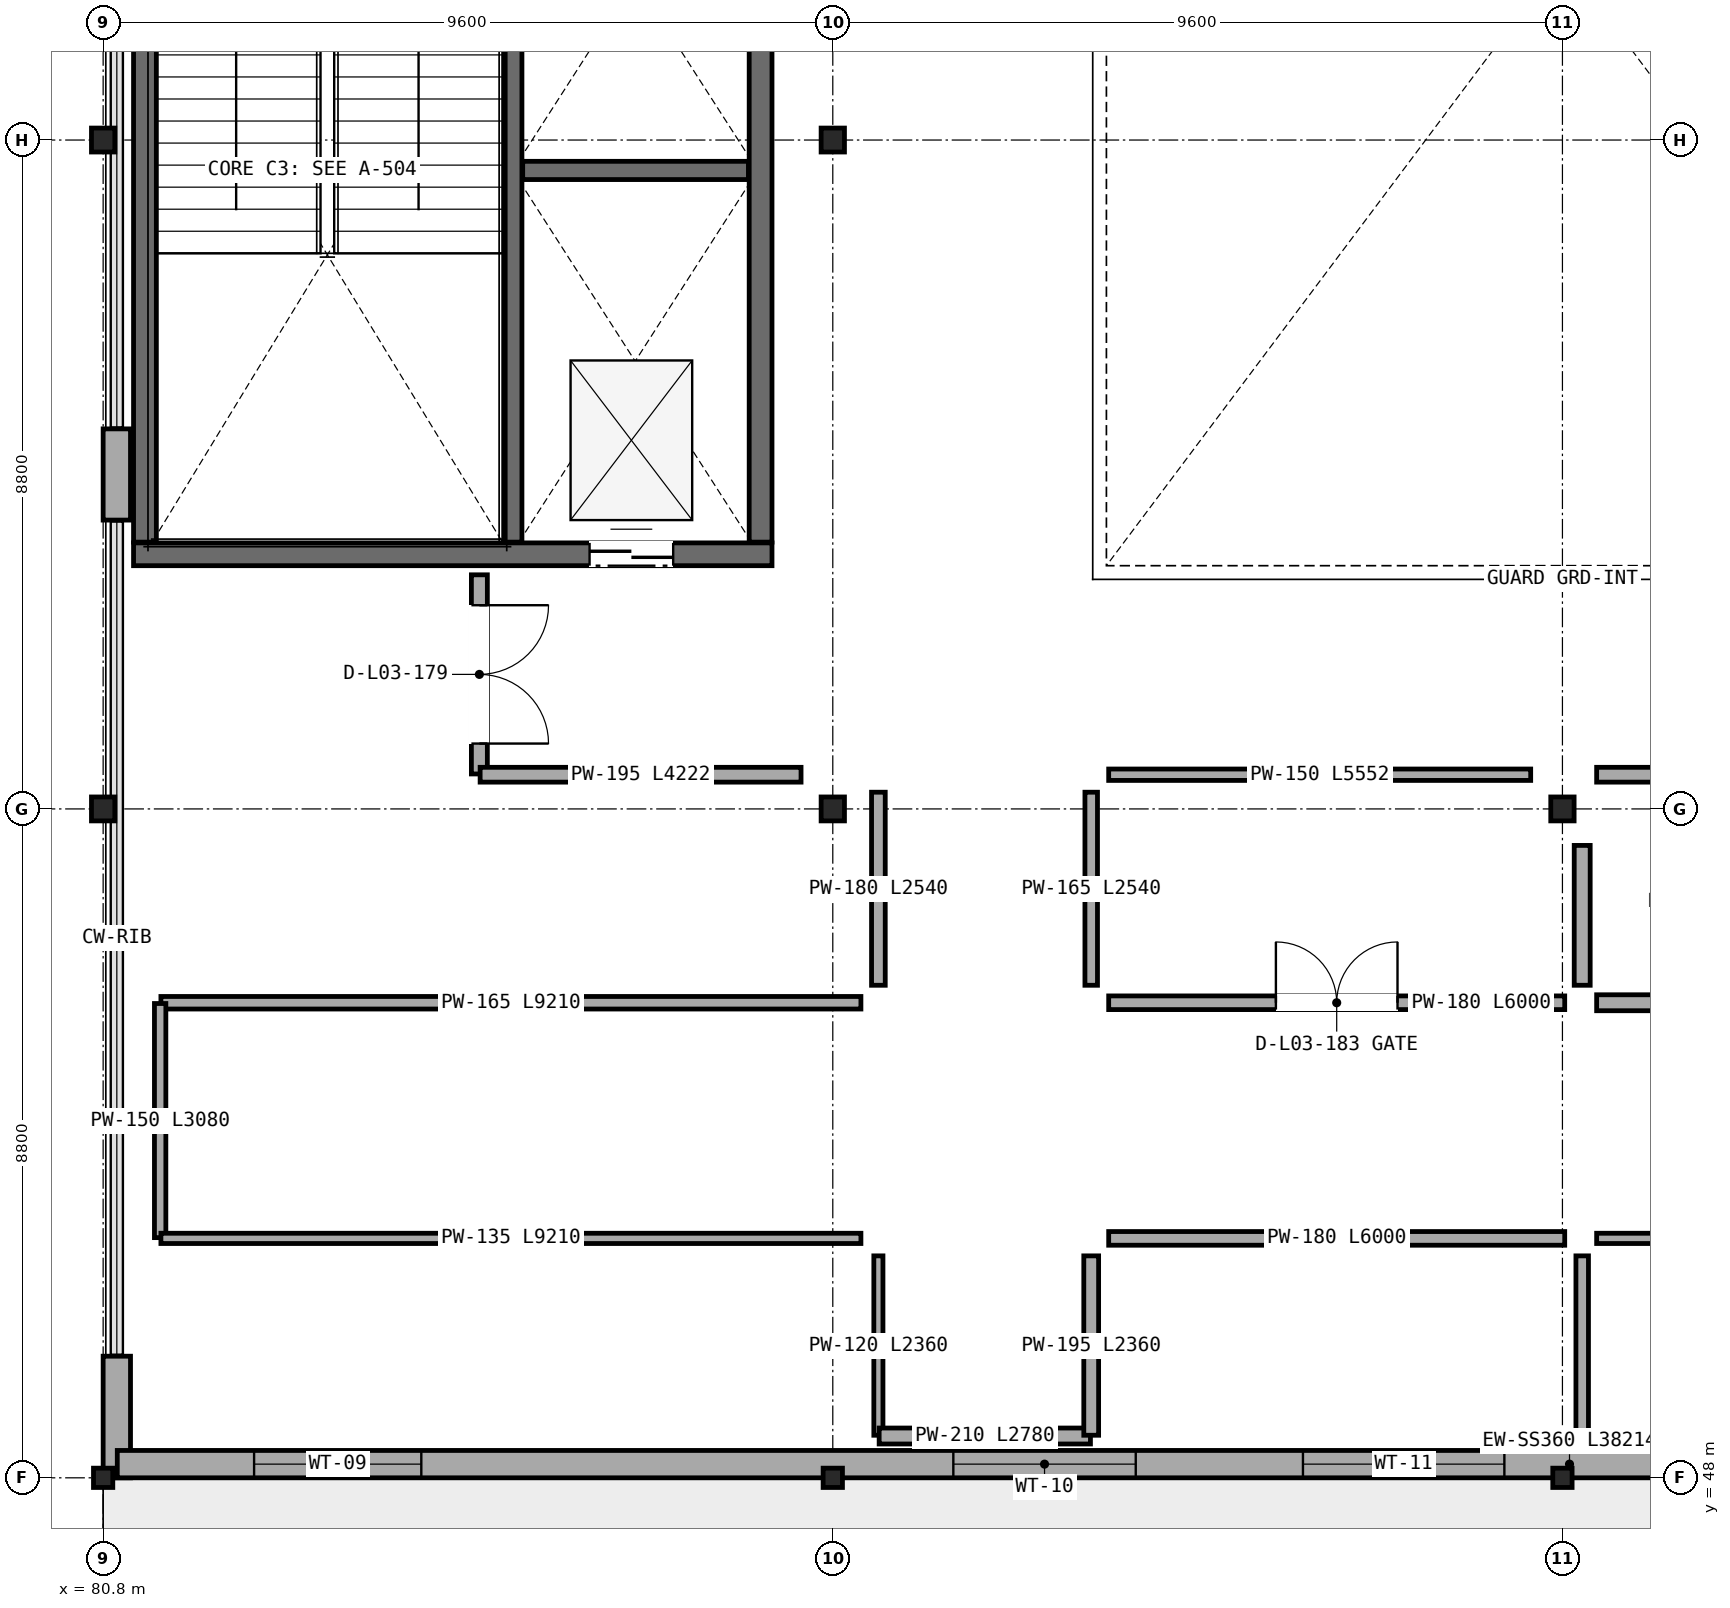
"""IFC4 building model, lengths in metres.
Left out: names, types, materials, properties, quantities, classifications, styles, units other than length and angle.
Written with IfcOpenShell. Run it as: python <this file> out.ifc"""

import sys

from ifc_helpers import new_model, si_unit, direction, frame, frame_2d, origin, origin_2d, place, context, subcontext, project, spatial, rectangle, i_section, extrude, element, fill, save


model = new_model("IFC4")
c1 = context("Model", 3, precision=1e-05, world=origin(), true_north=direction((0.0, 1.0)))
c2 = subcontext(c1, "Body", "Model", "MODEL_VIEW")
j1 = project(units=[si_unit("LENGTHUNIT", "METRE"), si_unit("PLANEANGLEUNIT", "RADIAN")], contexts=[c1])
p1 = place(None, origin())
s1 = spatial("IfcSite", under=j1, at=p1, CompositionType="ELEMENT")
p2 = place(p1, origin())
s2 = spatial("IfcBuilding", under=s1, at=p2, CompositionType="ELEMENT")
p3 = place(p2, frame((0.0, 0.0, 14.6)))
s3 = spatial("IfcBuildingStorey", under=s2, at=p3, CompositionType="ELEMENT", Elevation=14.6)
p4 = place(p3, frame((90.4, 48.0, 0.0), z_axis=(0.0, 0.0, 1.0), x_axis=(1.0, 0.0, 0.0)))
e1 = element("IfcColumn", 1, at=p4, inside=s3, PredefinedType="COLUMN", context=c2, shape_type="SweptSolid", body=[
    extrude(i_section(OverallWidth=0.254, OverallDepth=0.254, WebThickness=0.009, FlangeThickness=0.014, FilletRadius=0.013, at=origin_2d()), origin(), (0.0, 0.0, 1.0), 4.5),
])
for number, where, z_axis, x_axis in (
    (2, (90.4, 56.8, 0.0), (0.0, 0.0, 1.0), (1.0, 0.0, 0.0)),
    (3, (90.4, 65.6, 0.0), (0.0, 0.0, 1.0), (1.0, 0.0, 0.0)),
):
    element("IfcColumn", number, at=place(p3, frame(where, z_axis=z_axis, x_axis=x_axis)), inside=s3, PredefinedType="COLUMN", context=c2, shape_type="SweptSolid", body=[
        extrude(i_section(OverallWidth=0.307, OverallDepth=0.315, WebThickness=0.012, FlangeThickness=0.019, FilletRadius=0.017, at=origin_2d()), origin(), (0.0, 0.0, 1.0), 4.5),
    ])
p5 = place(p3, frame((100.0, 48.0, 0.0), z_axis=(0.0, 0.0, 1.0), x_axis=(1.0, 0.0, 0.0)))
e4 = element("IfcColumn", 4, at=p5, inside=s3, PredefinedType="COLUMN", context=c2, shape_type="SweptSolid", body=[
    extrude(i_section(OverallWidth=0.254, OverallDepth=0.254, WebThickness=0.009, FlangeThickness=0.014, FilletRadius=0.013, at=origin_2d()), origin(), (0.0, 0.0, 1.0), 4.5),
])
p6 = place(p3, frame((100.0, 56.8, 0.0), z_axis=(0.0, 0.0, 1.0), x_axis=(1.0, 0.0, 0.0)))
e5 = element("IfcColumn", 5, at=p6, inside=s3, PredefinedType="COLUMN", context=c2, shape_type="SweptSolid", body=[
    extrude(i_section(OverallWidth=0.307, OverallDepth=0.315, WebThickness=0.012, FlangeThickness=0.019, FilletRadius=0.017, at=origin_2d()), origin(), (0.0, 0.0, 1.0), 4.5),
])
p7 = place(p3, frame((80.8, 48.0, 0.0), z_axis=(0.0, 0.0, 1.0), x_axis=(1.0, 0.0, 0.0)))
e6 = element("IfcColumn", 6, at=p7, inside=s3, PredefinedType="COLUMN", context=c2, shape_type="SweptSolid", body=[
    extrude(i_section(OverallWidth=0.254, OverallDepth=0.254, WebThickness=0.009, FlangeThickness=0.014, FilletRadius=0.013, at=origin_2d()), origin(), (0.0, 0.0, 1.0), 4.5),
])
for number, where, z_axis, x_axis in (
    (7, (80.8, 56.8, 0.0), (0.0, 0.0, 1.0), (1.0, 0.0, 0.0)),
    (8, (80.8, 65.6, 0.0), (0.0, 0.0, 1.0), (1.0, 0.0, 0.0)),
):
    element("IfcColumn", number, at=place(p3, frame(where, z_axis=z_axis, x_axis=x_axis)), inside=s3, PredefinedType="COLUMN", context=c2, shape_type="SweptSolid", body=[
        extrude(i_section(OverallWidth=0.307, OverallDepth=0.315, WebThickness=0.012, FlangeThickness=0.019, FilletRadius=0.017, at=origin_2d()), origin(), (0.0, 0.0, 1.0), 4.5),
    ])
p8 = place(p3, frame((80.98, 61.8, 0.0), z_axis=(0.0, 0.0, 1.0), x_axis=(0.0, -1.0, 0.0)))
e9 = element("IfcWall", 9, at=p8, inside=s3, PredefinedType="SOLIDWALL", context=c2, shape_type="SweptSolid", body=[
    extrude(rectangle(XDim=1.2, YDim=0.36, at=frame_2d((0.6, 0.0))), origin(), (0.0, 0.0, 1.0), 3.778),
])
p9 = place(p3, frame((80.98, 49.6, 0.0), z_axis=(0.0, 0.0, 1.0), x_axis=(0.0, -1.0, 0.0)))
e10 = element("IfcWall", 10, at=p9, inside=s3, PredefinedType="SOLIDWALL", context=c2, shape_type="SweptSolid", body=[
    extrude(rectangle(XDim=1.6, YDim=0.36, at=frame_2d((0.8, 0.0))), origin(), (0.0, 0.0, 1.0), 3.682),
])
p10 = place(p3, frame((80.986, 48.18, 0.0), z_axis=(0.0, 0.0, 1.0), x_axis=(1.0, 0.0, 0.0)))
e11 = element("IfcWall", 11, at=p10, inside=s3, PredefinedType="SOLIDWALL", context=c2, shape_type="SweptSolid", body=[
    extrude(rectangle(XDim=38.214, YDim=0.36, at=frame_2d((19.107, 0.0))), origin(), (0.0, 0.0, 1.0), 3.682),
])
p11 = place(p10, frame((1.8, 0.0, 0.9)))
e12 = element("IfcOpeningElement", 12, at=p11, cuts=e11, PredefinedType="OPENING", context=c2, shape_type="SweptSolid", body=[
    extrude(rectangle(XDim=2.2, YDim=1.55, at=frame_2d((1.1, 0.775))), frame((0.0, 0.19, 0.0), z_axis=(0.0, -1.0, 0.0), x_axis=(1.0, 0.0, 0.0)), (0.0, 0.0, 1.0), 0.38),
])
p12 = place(p10, frame((11.0, 0.0, 0.9)))
e13 = element("IfcOpeningElement", 13, at=p12, cuts=e11, PredefinedType="OPENING", context=c2, shape_type="SweptSolid", body=[
    extrude(rectangle(XDim=2.4, YDim=1.55, at=frame_2d((1.2, 0.775))), frame((0.0, 0.19, 0.0), z_axis=(0.0, -1.0, 0.0), x_axis=(1.0, 0.0, 0.0)), (0.0, 0.0, 1.0), 0.38),
])
p13 = place(p10, frame((15.6, 0.0, 0.9)))
e14 = element("IfcOpeningElement", 14, at=p13, cuts=e11, PredefinedType="OPENING", context=c2, shape_type="SweptSolid", body=[
    extrude(rectangle(XDim=2.65, YDim=1.55, at=frame_2d((1.325, 0.775))), frame((0.0, 0.19, 0.0), z_axis=(0.0, -1.0, 0.0), x_axis=(1.0, 0.0, 0.0)), (0.0, 0.0, 1.0), 0.38),
])
p14 = place(p10, frame((20.2, 0.0, 0.9)))
e15 = element("IfcOpeningElement", 15, at=p14, cuts=e11, PredefinedType="OPENING", context=c2, shape_type="SweptSolid", body=[
    extrude(rectangle(XDim=0.95, YDim=1.85, at=frame_2d((0.475, 0.925))), frame((0.0, 0.19, 0.0), z_axis=(0.0, -1.0, 0.0), x_axis=(1.0, 0.0, 0.0)), (0.0, 0.0, 1.0), 0.38),
])
p15 = place(p10, frame((24.8, 0.0, 0.9)))
e16 = element("IfcOpeningElement", 16, at=p15, cuts=e11, PredefinedType="OPENING", context=c2, shape_type="SweptSolid", body=[
    extrude(rectangle(XDim=1.1, YDim=1.85, at=frame_2d((0.55, 0.925))), frame((0.0, 0.19, 0.0), z_axis=(0.0, -1.0, 0.0), x_axis=(1.0, 0.0, 0.0)), (0.0, 0.0, 1.0), 0.38),
])
p16 = place(p10, frame((29.4, 0.0, 0.9)))
e17 = element("IfcOpeningElement", 17, at=p16, cuts=e11, PredefinedType="OPENING", context=c2, shape_type="SweptSolid", body=[
    extrude(rectangle(XDim=1.25, YDim=1.85, at=frame_2d((0.625, 0.925))), frame((0.0, 0.19, 0.0), z_axis=(0.0, -1.0, 0.0), x_axis=(1.0, 0.0, 0.0)), (0.0, 0.0, 1.0), 0.38),
])
p17 = place(p3, frame((81.2, 60.15, 0.0), z_axis=(0.0, 0.0, 1.0), x_axis=(1.0, 0.0, 0.0)))
e18 = element("IfcWall", 18, at=p17, inside=s3, PredefinedType="SHEAR", context=c2, shape_type="SweptSolid", body=[
    extrude(rectangle(XDim=8.4, YDim=0.3, at=frame_2d((4.2, 0.0))), origin(), (0.0, 0.0, 1.0), 4.245),
])
p18 = place(p17, frame((6.0, 0.0, 0.0)))
e19 = element("IfcOpeningElement", 19, at=p18, cuts=e18, PredefinedType="OPENING", context=c2, shape_type="SweptSolid", body=[
    extrude(rectangle(XDim=1.1, YDim=2.2, at=frame_2d((0.55, 1.1))), frame((0.0, 0.16, 0.0), z_axis=(0.0, -1.0, 0.0), x_axis=(1.0, 0.0, 0.0)), (0.0, 0.0, 1.0), 0.32),
])
for number, where, z_axis, x_axis in (
    (20, (89.45, 60.31, 0.0), (0.0, 0.0, 1.0), (0.0, 1.0, 0.0)),
    (21, (81.35, 70.09, 0.0), (0.0, 0.0, 1.0), (0.0, -1.0, 0.0)),
):
    element("IfcWall", number, at=place(p3, frame(where, z_axis=z_axis, x_axis=x_axis)), inside=s3, PredefinedType="SHEAR", context=c2, shape_type="SweptSolid", body=[
        extrude(rectangle(XDim=9.78, YDim=0.3, at=frame_2d((4.89, 0.0))), origin(), (0.0, 0.0, 1.0), 4.245),
    ])
p19 = place(p3, frame((86.19, 60.31, 0.0), z_axis=(0.0, 0.0, 1.0), x_axis=(0.0, 1.0, 0.0)))
e22 = element("IfcWall", 22, at=p19, inside=s3, PredefinedType="SOLIDWALL", context=c2, shape_type="SweptSolid", body=[
    extrude(rectangle(XDim=9.78, YDim=0.24, at=frame_2d((4.89, 0.0))), origin(), (0.0, 0.0, 1.0), 4.245),
])
p20 = place(p3, frame((86.32, 65.2, 0.0), z_axis=(0.0, 0.0, 1.0), x_axis=(1.0, 0.0, 0.0)))
e23 = element("IfcWall", 23, at=p20, inside=s3, PredefinedType="SOLIDWALL", context=c2, shape_type="SweptSolid", body=[
    extrude(rectangle(XDim=2.97, YDim=0.24, at=frame_2d((1.485, 0.0))), origin(), (0.0, 0.0, 1.0), 4.245),
])
p21 = place(p3, frame((85.75, 59.88, 0.0), z_axis=(0.0, 0.0, 1.0), x_axis=(0.0, -1.0, 0.0)))
e24 = element("IfcWall", 24, at=p21, inside=s3, PredefinedType="PARTITIONING", context=c2, shape_type="SweptSolid", body=[
    extrude(rectangle(XDim=2.62, YDim=0.21, at=frame_2d((1.31, 0.0))), origin(), (0.0, 0.0, 1.0), 4.13),
])
p22 = place(p21, frame((0.4, 0.0, 0.0)))
e25 = element("IfcOpeningElement", 25, at=p22, cuts=e24, PredefinedType="OPENING", context=c2, shape_type="SweptSolid", body=[
    extrude(rectangle(XDim=1.82, YDim=2.34, at=frame_2d((0.91, 1.17))), frame((0.0, 0.115, 0.0), z_axis=(0.0, -1.0, 0.0), x_axis=(1.0, 0.0, 0.0)), (0.0, 0.0, 1.0), 0.23),
])
p23 = place(p3, frame((85.76, 57.25, 0.0), z_axis=(0.0, 0.0, 1.0), x_axis=(1.0, 0.0, 0.0)))
e26 = element("IfcWall", 26, at=p23, inside=s3, PredefinedType="PARTITIONING", context=c2, shape_type="SweptSolid", body=[
    extrude(rectangle(XDim=4.222, YDim=0.195, at=frame_2d((2.111, 0.0))), origin(), (0.0, 0.0, 1.0), 4.13),
])
p24 = place(p3, frame((91.0, 57.02, 0.0), z_axis=(0.0, 0.0, 1.0), x_axis=(0.0, -1.0, 0.0)))
e27 = element("IfcWall", 27, at=p24, inside=s3, PredefinedType="PARTITIONING", context=c2, shape_type="SweptSolid", body=[
    extrude(rectangle(XDim=2.54, YDim=0.18, at=frame_2d((1.27, 0.0))), origin(), (0.0, 0.0, 1.0), 3.667),
])
p25 = place(p3, frame((90.77, 54.25, 0.0), z_axis=(0.0, 0.0, 1.0), x_axis=(-1.0, 0.0, 0.0)))
e28 = element("IfcWall", 28, at=p25, inside=s3, PredefinedType="PARTITIONING", context=c2, shape_type="SweptSolid", body=[
    extrude(rectangle(XDim=9.21, YDim=0.165, at=frame_2d((4.605, 0.0))), origin(), (0.0, 0.0, 1.0), 3.743),
])
p26 = place(p3, frame((81.55, 54.24, 0.0), z_axis=(0.0, 0.0, 1.0), x_axis=(0.0, -1.0, 0.0)))
e29 = element("IfcWall", 29, at=p26, inside=s3, PredefinedType="PARTITIONING", context=c2, shape_type="SweptSolid", body=[
    extrude(rectangle(XDim=3.08, YDim=0.15, at=frame_2d((1.54, 0.0))), origin(), (0.0, 0.0, 1.0), 4.13),
])
p27 = place(p3, frame((81.56, 51.15, 0.0), z_axis=(0.0, 0.0, 1.0), x_axis=(1.0, 0.0, 0.0)))
e30 = element("IfcWall", 30, at=p27, inside=s3, PredefinedType="PARTITIONING", context=c2, shape_type="SweptSolid", body=[
    extrude(rectangle(XDim=9.21, YDim=0.135, at=frame_2d((4.605, 0.0))), origin(), (0.0, 0.0, 1.0), 3.743),
])
p28 = place(p3, frame((91.0, 50.92, 0.0), z_axis=(0.0, 0.0, 1.0), x_axis=(0.0, -1.0, 0.0)))
e31 = element("IfcWall", 31, at=p28, inside=s3, PredefinedType="PARTITIONING", context=c2, shape_type="SweptSolid", body=[
    extrude(rectangle(XDim=2.36, YDim=0.12, at=frame_2d((1.18, 0.0))), origin(), (0.0, 0.0, 1.0), 4.13),
])
p29 = place(p3, frame((91.01, 48.55, 0.0), z_axis=(0.0, 0.0, 1.0), x_axis=(1.0, 0.0, 0.0)))
e32 = element("IfcWall", 32, at=p29, inside=s3, PredefinedType="PARTITIONING", context=c2, shape_type="SweptSolid", body=[
    extrude(rectangle(XDim=2.78, YDim=0.21, at=frame_2d((1.39, 0.0))), origin(), (0.0, 0.0, 1.0), 3.944),
])
p30 = place(p3, frame((93.8, 48.56, 0.0), z_axis=(0.0, 0.0, 1.0), x_axis=(0.0, 1.0, 0.0)))
e33 = element("IfcWall", 33, at=p30, inside=s3, PredefinedType="PARTITIONING", context=c2, shape_type="SweptSolid", body=[
    extrude(rectangle(XDim=2.36, YDim=0.195, at=frame_2d((1.18, 0.0))), origin(), (0.0, 0.0, 1.0), 4.13),
])
p31 = place(p3, frame((94.03, 51.15, 0.0), z_axis=(0.0, 0.0, 1.0), x_axis=(1.0, 0.0, 0.0)))
e34 = element("IfcWall", 34, at=p31, inside=s3, PredefinedType="PARTITIONING", context=c2, shape_type="SweptSolid", body=[
    extrude(rectangle(XDim=6.0, YDim=0.18, at=frame_2d((3.0, 0.0))), origin(), (0.0, 0.0, 1.0), 3.743),
])
p32 = place(p3, frame((100.03, 54.25, 0.0), z_axis=(0.0, 0.0, 1.0), x_axis=(-1.0, 0.0, 0.0)))
e35 = element("IfcWall", 35, at=p32, inside=s3, PredefinedType="PARTITIONING", context=c2, shape_type="SweptSolid", body=[
    extrude(rectangle(XDim=6.0, YDim=0.18, at=frame_2d((3.0, 0.0))), origin(), (0.0, 0.0, 1.0), 3.743),
])
p33 = place(p32, frame((2.2, 0.0, 0.0)))
e36 = element("IfcOpeningElement", 36, at=p33, cuts=e35, PredefinedType="OPENING", context=c2, shape_type="SweptSolid", body=[
    extrude(rectangle(XDim=1.6, YDim=2.1, at=frame_2d((0.8, 1.05))), frame((0.0, 0.1, 0.0), z_axis=(0.0, -1.0, 0.0), x_axis=(1.0, 0.0, 0.0)), (0.0, 0.0, 1.0), 0.2),
])
p34 = place(p3, frame((93.8, 54.48, 0.0), z_axis=(0.0, 0.0, 1.0), x_axis=(0.0, 1.0, 0.0)))
e37 = element("IfcWall", 37, at=p34, inside=s3, PredefinedType="PARTITIONING", context=c2, shape_type="SweptSolid", body=[
    extrude(rectangle(XDim=2.54, YDim=0.165, at=frame_2d((1.27, 0.0))), origin(), (0.0, 0.0, 1.0), 3.667),
])
p35 = place(p3, frame((94.03, 57.25, 0.0), z_axis=(0.0, 0.0, 1.0), x_axis=(1.0, 0.0, 0.0)))
e38 = element("IfcWall", 38, at=p35, inside=s3, PredefinedType="PARTITIONING", context=c2, shape_type="SweptSolid", body=[
    extrude(rectangle(XDim=5.552, YDim=0.15, at=frame_2d((2.776, 0.0))), origin(), (0.0, 0.0, 1.0), 4.13),
])
p36 = place(p3, frame((100.45, 51.15, 0.0), z_axis=(0.0, 0.0, 1.0), x_axis=(1.0, 0.0, 0.0)))
e39 = element("IfcWall", 39, at=p36, inside=s3, PredefinedType="PARTITIONING", context=c2, shape_type="SweptSolid", body=[
    extrude(rectangle(XDim=5.52, YDim=0.135, at=frame_2d((2.76, 0.0))), origin(), (0.0, 0.0, 1.0), 3.993),
])
p37 = place(p3, frame((105.97, 54.25, 0.0), z_axis=(0.0, 0.0, 1.0), x_axis=(-1.0, 0.0, 0.0)))
e40 = element("IfcWall", 40, at=p37, inside=s3, PredefinedType="PARTITIONING", context=c2, shape_type="SweptSolid", body=[
    extrude(rectangle(XDim=5.52, YDim=0.21, at=frame_2d((2.76, 0.0))), origin(), (0.0, 0.0, 1.0), 3.993),
])
p38 = place(p3, frame((100.45, 57.25, 0.0), z_axis=(0.0, 0.0, 1.0), x_axis=(1.0, 0.0, 0.0)))
e41 = element("IfcWall", 41, at=p38, inside=s3, PredefinedType="PARTITIONING", context=c2, shape_type="SweptSolid", body=[
    extrude(rectangle(XDim=5.52, YDim=0.195, at=frame_2d((2.76, 0.0))), origin(), (0.0, 0.0, 1.0), 4.13),
])
p39 = place(p3, frame((100.26, 50.92, 0.0), z_axis=(0.0, 0.0, 1.0), x_axis=(0.0, -1.0, 0.0)))
e42 = element("IfcWall", 42, at=p39, inside=s3, PredefinedType="PARTITIONING", context=c2, shape_type="SweptSolid", body=[
    extrude(rectangle(XDim=2.44, YDim=0.165, at=frame_2d((1.22, 0.0))), origin(), (0.0, 0.0, 1.0), 3.743),
])
p40 = place(p3, frame((100.26, 56.32, 0.0), z_axis=(0.0, 0.0, 1.0), x_axis=(0.0, -1.0, 0.0)))
e43 = element("IfcWall", 43, at=p40, inside=s3, PredefinedType="PARTITIONING", context=c2, shape_type="SweptSolid", body=[
    extrude(rectangle(XDim=1.84, YDim=0.21, at=frame_2d((0.92, 0.0))), origin(), (0.0, 0.0, 1.0), 3.743),
])
p41 = place(p11, origin())
e44 = element("IfcWindow", 44, at=p41, inside=s3, PartitioningType="SINGLE_PANEL", PredefinedType="WINDOW", context=c2, shape_type="SweptSolid", body=[
    extrude(rectangle(XDim=2.2, YDim=1.55, at=frame_2d((1.1, 0.775))), frame((0.0, 0.03, 0.0), z_axis=(0.0, -1.0, 0.0), x_axis=(1.0, 0.0, 0.0)), (0.0, 0.0, 1.0), 0.06),
])
fill(e12, e44)
p42 = place(p12, origin())
e45 = element("IfcWindow", 45, at=p42, inside=s3, PartitioningType="SINGLE_PANEL", PredefinedType="WINDOW", context=c2, shape_type="SweptSolid", body=[
    extrude(rectangle(XDim=2.4, YDim=1.55, at=frame_2d((1.2, 0.775))), frame((0.0, 0.03, 0.0), z_axis=(0.0, -1.0, 0.0), x_axis=(1.0, 0.0, 0.0)), (0.0, 0.0, 1.0), 0.06),
])
fill(e13, e45)
p43 = place(p13, origin())
e46 = element("IfcWindow", 46, at=p43, inside=s3, PartitioningType="SINGLE_PANEL", PredefinedType="WINDOW", context=c2, shape_type="SweptSolid", body=[
    extrude(rectangle(XDim=2.65, YDim=1.55, at=frame_2d((1.325, 0.775))), frame((0.0, 0.03, 0.0), z_axis=(0.0, -1.0, 0.0), x_axis=(1.0, 0.0, 0.0)), (0.0, 0.0, 1.0), 0.06),
])
fill(e14, e46)
p44 = place(p18, origin())
e47 = element("IfcDoor", 47, at=p44, inside=s3, OperationType="DOUBLE_DOOR_SLIDING", PredefinedType="DOOR", context=c2, shape_type="SweptSolid", body=[
    extrude(rectangle(XDim=1.1, YDim=2.2, at=frame_2d((0.55, 1.1))), frame((0.0, 0.025, 0.0), z_axis=(0.0, -1.0, 0.0), x_axis=(1.0, 0.0, 0.0)), (0.0, 0.0, 1.0), 0.05),
])
fill(e19, e47)
p45 = place(p22, origin())
e48 = element("IfcDoor", 48, at=p45, inside=s3, OperationType="DOUBLE_DOOR_SINGLE_SWING", PredefinedType="DOOR", context=c2, shape_type="SweptSolid", body=[
    extrude(rectangle(XDim=1.82, YDim=2.34, at=frame_2d((0.91, 1.17))), frame((0.0, 0.025, 0.0), z_axis=(0.0, -1.0, 0.0), x_axis=(1.0, 0.0, 0.0)), (0.0, 0.0, 1.0), 0.05),
])
fill(e25, e48)
p46 = place(p33, frame((1.6, 0.0, 0.0), z_axis=(0.0, 0.0, 1.0), x_axis=(-1.0, 0.0, 0.0)))
e49 = element("IfcDoor", 49, at=p46, inside=s3, OperationType="DOUBLE_DOOR_SINGLE_SWING", PredefinedType="GATE", context=c2, shape_type="SweptSolid", body=[
    extrude(rectangle(XDim=1.6, YDim=2.1, at=frame_2d((0.8, 1.05))), frame((0.0, 0.025, 0.0), z_axis=(0.0, -1.0, 0.0), x_axis=(1.0, 0.0, 0.0)), (0.0, 0.0, 1.0), 0.05),
])
fill(e36, e49)
save(model, sys.argv[1])
